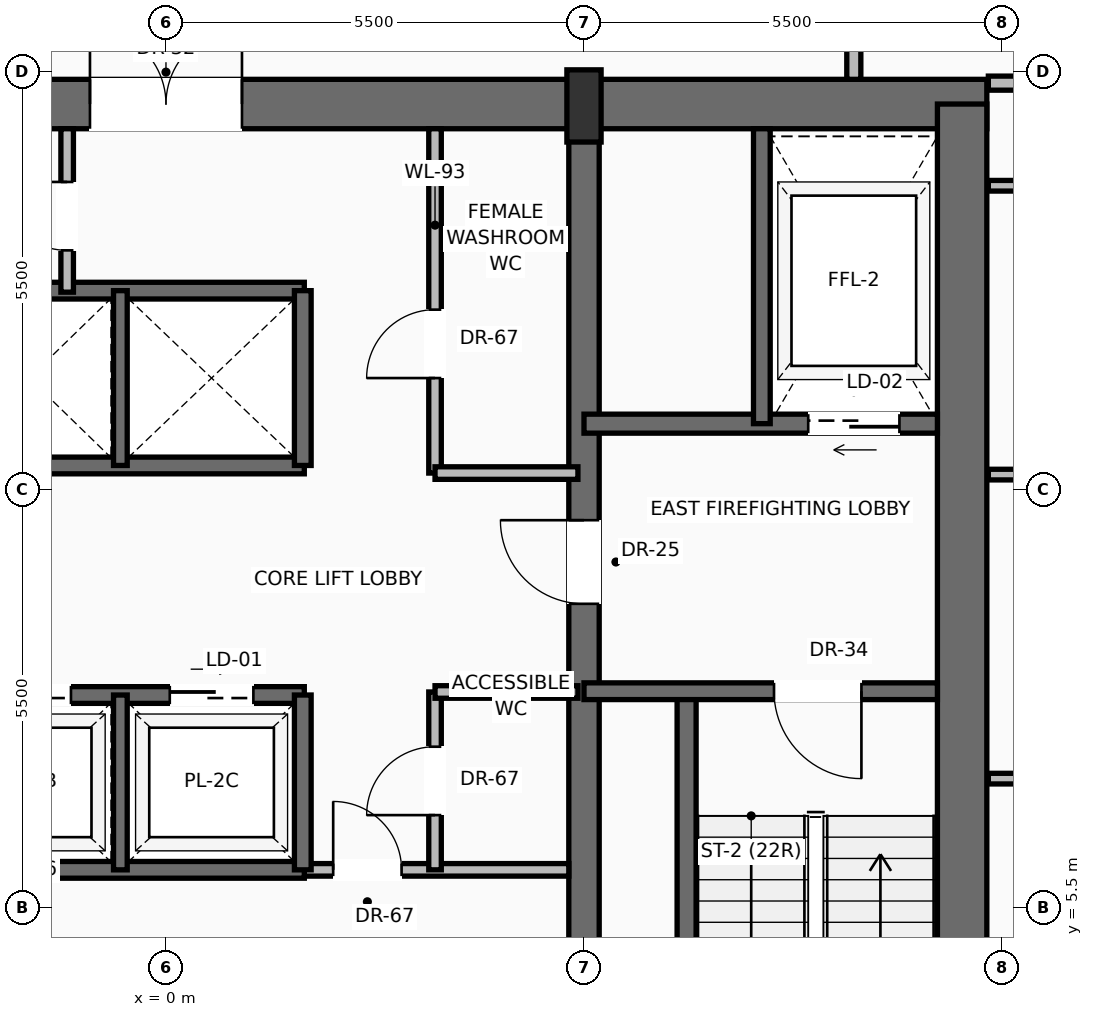
"""IFC4 building model, lengths in metres.
Left out: names, types, materials, properties, quantities, classifications, styles, units other than length and angle.
Written with IfcOpenShell. Run it as: python <this file> out.ifc"""

import sys

from ifc_helpers import new_model, si_unit, direction, frame, frame_2d, origin, origin_2d, place, context, subcontext, project, spatial, rectangle, extrude, source, transform, mapped, element, fill, save


model = new_model("IFC4")
c1 = context("Model", 3, precision=1e-05, world=origin(), true_north=direction((0.0, 1.0)))
c2 = subcontext(c1, "Body", "Model", "MODEL_VIEW")
j1 = project(units=[si_unit("LENGTHUNIT", "METRE"), si_unit("PLANEANGLEUNIT", "RADIAN")], contexts=[c1])
p1 = place(None, origin())
s1 = spatial("IfcSite", under=j1, at=p1, CompositionType="ELEMENT")
p2 = place(p1, origin())
s2 = spatial("IfcBuilding", under=s1, at=p2, CompositionType="ELEMENT")
p3 = place(p2, frame((0.0, 0.0, 204.3)))
s3 = spatial("IfcBuildingStorey", under=s2, at=p3, CompositionType="ELEMENT", Elevation=204.3)
p4 = place(p3, frame((-10.8, 16.075, 0.0), z_axis=(0.0, 0.0, 1.0), x_axis=(1.0, 0.0, 0.0)))
e1 = element("IfcWall", 1, at=p4, inside=s3, PredefinedType="SHEAR", context=c2, shape_type="SweptSolid", body=[
    extrude(rectangle(XDim=21.6, YDim=0.65, at=frame_2d((10.8, 0.0))), origin(), (0.0, 0.0, 1.0), 3.47),
])
p5 = place(p4, frame((3.37, 0.0, 0.0)))
e2 = element("IfcOpeningElement", 2, at=p5, cuts=e1, PredefinedType="OPENING", context=c2, shape_type="SweptSolid", body=[
    extrude(rectangle(XDim=1.3, YDim=2.3, at=frame_2d((0.65, 1.15))), frame((0.0, 0.335, 0.0), z_axis=(0.0, -1.0, 0.0), x_axis=(1.0, 0.0, 0.0)), (0.0, 0.0, 1.0), 0.67),
])
p6 = place(p4, frame((9.8, 0.0, 0.0)))
e3 = element("IfcOpeningElement", 3, at=p6, cuts=e1, PredefinedType="OPENING", context=c2, shape_type="SweptSolid", body=[
    extrude(rectangle(XDim=2.0, YDim=2.4, at=frame_2d((1.0, 1.2))), frame((0.0, 0.335, 0.0), z_axis=(0.0, -1.0, 0.0), x_axis=(1.0, 0.0, 0.0)), (0.0, 0.0, 1.0), 0.67),
])
p7 = place(p3, frame((10.475, 0.525, 0.0), z_axis=(0.0, 0.0, 1.0), x_axis=(0.0, 1.0, 0.0)))
e4 = element("IfcWall", 4, at=p7, inside=s3, PredefinedType="SHEAR", context=c2, shape_type="SweptSolid", body=[
    extrude(rectangle(XDim=15.55, YDim=0.65, at=frame_2d((7.775, 0.0))), origin(), (0.0, 0.0, 1.0), 3.47),
])
p8 = place(p3, frame((5.5, 0.525, 0.0), z_axis=(0.0, 0.0, 1.0), x_axis=(0.0, 1.0, 0.0)))
e5 = element("IfcWall", 5, at=p8, inside=s3, PredefinedType="SHEAR", context=c2, shape_type="SweptSolid", body=[
    extrude(rectangle(XDim=15.55, YDim=0.4, at=frame_2d((7.775, 0.0))), origin(), (0.0, 0.0, 1.0), 3.47),
])
p9 = place(p8, frame((8.975, 0.0, 0.0)))
e6 = element("IfcOpeningElement", 6, at=p9, cuts=e5, PredefinedType="OPENING", context=c2, shape_type="SweptSolid", body=[
    extrude(rectangle(XDim=1.1, YDim=2.2, at=frame_2d((0.55, 1.1))), frame((0.0, 0.21, 0.0), z_axis=(0.0, -1.0, 0.0), x_axis=(1.0, 0.0, 0.0)), (0.0, 0.0, 1.0), 0.42),
])
m1 = source(origin(), c2, "Body", "SweptSolid", [
    extrude(rectangle(XDim=0.45, YDim=0.95, at=origin_2d()), origin(), (0.0, 0.0, 1.0), 3.7),
])
p10 = place(p3, frame((5.5, 16.05, 0.0), z_axis=(0.0, 0.0, 1.0), x_axis=(1.0, 0.0, 0.0)))
e7 = element("IfcColumn", 7, at=p10, inside=s3, PredefinedType="PILASTER", context=c2, shape_type="MappedRepresentation", body=[
    mapped(m1, transform((0.0, 0.0, 0.0), scale=1.0)),
])
p11 = place(p3, frame((9.417, 32.314, 0.0), z_axis=(0.0, 0.0, 1.0), x_axis=(0.533466142651, -0.845821420067, 0.0)))
e8 = element("IfcWall", 8, at=p11, inside=s3, PredefinedType="SOLIDWALL", context=c2, shape_type="SweptSolid", body=[
    extrude(rectangle(XDim=19.147, YDim=0.28, at=frame_2d((9.574, 0.0))), origin(), (0.0, 0.0, 1.0), 3.05),
])
p12 = place(p11, frame((4.595, 0.0, 0.0)))
e9 = element("IfcOpeningElement", 9, at=p12, cuts=e8, PredefinedType="OPENING", context=c2, shape_type="SweptSolid", body=[
    extrude(rectangle(XDim=1.6, YDim=2.35, at=frame_2d((0.8, 1.175))), frame((0.0, 0.15, 0.0), z_axis=(0.0, -1.0, 0.0), x_axis=(1.0, 0.0, 0.0)), (0.0, 0.0, 1.0), 0.3),
])
p13 = place(p11, frame((13.02, 0.0, 0.9)))
e10 = element("IfcOpeningElement", 10, at=p13, cuts=e8, PredefinedType="OPENING", context=c2, shape_type="SweptSolid", body=[
    extrude(rectangle(XDim=2.0, YDim=1.85, at=frame_2d((1.0, 0.925))), frame((0.0, 0.15, 0.0), z_axis=(0.0, -1.0, 0.0), x_axis=(1.0, 0.0, 0.0)), (0.0, 0.0, 1.0), 0.3),
])
p14 = place(p3, frame((6.85, 0.85, 0.0), z_axis=(0.0, 0.0, 1.0), x_axis=(0.0, 1.0, 0.0)))
e11 = element("IfcWall", 11, at=p14, inside=s3, PredefinedType="SOLIDWALL", context=c2, shape_type="SweptSolid", body=[
    extrude(rectangle(XDim=7.5, YDim=0.25, at=frame_2d((3.75, 0.0))), origin(), (0.0, 0.0, 1.0), 3.47),
])
p15 = place(p3, frame((10.15, 8.35, 0.0), z_axis=(0.0, 0.0, 1.0), x_axis=(-1.0, 0.0, 0.0)))
e12 = element("IfcWall", 12, at=p15, inside=s3, PredefinedType="SOLIDWALL", context=c2, shape_type="SweptSolid", body=[
    extrude(rectangle(XDim=4.65, YDim=0.22, at=frame_2d((2.325, 0.0))), origin(), (0.0, 0.0, 1.0), 3.47),
])
p16 = place(p15, frame((1.0, 0.0, 0.0)))
e13 = element("IfcOpeningElement", 13, at=p16, cuts=e12, PredefinedType="OPENING", context=c2, shape_type="SweptSolid", body=[
    extrude(rectangle(XDim=1.15, YDim=2.2, at=frame_2d((0.575, 1.1))), frame((0.0, 0.12, 0.0), z_axis=(0.0, -1.0, 0.0), x_axis=(1.0, 0.0, 0.0)), (0.0, 0.0, 1.0), 0.24),
])
p17 = place(p3, frame((10.15, 11.87, 0.0), z_axis=(0.0, 0.0, 1.0), x_axis=(-1.0, 0.0, 0.0)))
e14 = element("IfcWall", 14, at=p17, inside=s3, PredefinedType="SOLIDWALL", context=c2, shape_type="SweptSolid", body=[
    extrude(rectangle(XDim=4.65, YDim=0.25, at=frame_2d((2.325, 0.0))), origin(), (0.0, 0.0, 1.0), 3.47),
])
p18 = place(p17, frame((0.5, 0.0, 0.0)))
e15 = element("IfcOpeningElement", 15, at=p18, cuts=e14, PredefinedType="OPENING", context=c2, shape_type="SweptSolid", body=[
    extrude(rectangle(XDim=1.2, YDim=2.25, at=frame_2d((0.6, 1.125))), frame((0.0, 0.135, 0.0), z_axis=(0.0, -1.0, 0.0), x_axis=(1.0, 0.0, 0.0)), (0.0, 0.0, 1.0), 0.27),
])
p19 = place(p3, frame((7.84, 11.87, 0.0), z_axis=(0.0, 0.0, 1.0), x_axis=(0.0, 1.0, 0.0)))
e16 = element("IfcWall", 16, at=p19, inside=s3, PredefinedType="SOLIDWALL", context=c2, shape_type="SweptSolid", body=[
    extrude(rectangle(XDim=3.88, YDim=0.22, at=frame_2d((1.94, 0.0))), origin(), (0.0, 0.0, 1.0), 3.47),
])
p20 = place(p3, frame((1.82, 6.0, 0.0), z_axis=(0.0, 0.0, 1.0), x_axis=(1.0, 0.0, 0.0)))
e17 = element("IfcWall", 17, at=p20, inside=s3, PredefinedType="PARTITIONING", context=c2, shape_type="SweptSolid", body=[
    extrude(rectangle(XDim=3.48, YDim=0.165, at=frame_2d((1.74, 0.0))), origin(), (0.0, 0.0, 1.0), 3.462),
])
p21 = place(p20, frame((0.38, 0.0, 0.0)))
e18 = element("IfcOpeningElement", 18, at=p21, cuts=e17, PredefinedType="OPENING", context=c2, shape_type="SweptSolid", body=[
    extrude(rectangle(XDim=0.9, YDim=2.1, at=frame_2d((0.45, 1.05))), frame((0.0, 0.093, 0.0), z_axis=(0.0, -1.0, 0.0), x_axis=(1.0, 0.0, 0.0)), (0.0, 0.0, 1.0), 0.185),
])
p22 = place(p3, frame((3.54, 6.0, 0.0), z_axis=(0.0, 0.0, 1.0), x_axis=(0.0, 1.0, 0.0)))
e19 = element("IfcWall", 19, at=p22, inside=s3, PredefinedType="PARTITIONING", context=c2, shape_type="SweptSolid", body=[
    extrude(rectangle(XDim=2.34, YDim=0.165, at=frame_2d((1.17, 0.0))), origin(), (0.0, 0.0, 1.0), 3.462),
])
p23 = place(p22, frame((0.72, 0.0, 0.0)))
e20 = element("IfcOpeningElement", 20, at=p23, cuts=e19, PredefinedType="OPENING", context=c2, shape_type="SweptSolid", body=[
    extrude(rectangle(XDim=0.9, YDim=2.1, at=frame_2d((0.45, 1.05))), frame((0.0, 0.093, 0.0), z_axis=(0.0, -1.0, 0.0), x_axis=(1.0, 0.0, 0.0)), (0.0, 0.0, 1.0), 0.185),
])
p24 = place(p3, frame((3.54, 8.34, 0.0), z_axis=(0.0, 0.0, 1.0), x_axis=(1.0, 0.0, 0.0)))
e21 = element("IfcWall", 21, at=p24, inside=s3, PredefinedType="PARTITIONING", context=c2, shape_type="SweptSolid", body=[
    extrude(rectangle(XDim=1.88, YDim=0.165, at=frame_2d((0.94, 0.0))), origin(), (0.0, 0.0, 1.0), 3.462),
])
p25 = place(p3, frame((-5.5, 6.0, 0.0), z_axis=(0.0, 0.0, 1.0), x_axis=(1.0, 0.0, 0.0)))
e22 = element("IfcWall", 22, at=p25, inside=s3, PredefinedType="SOLIDWALL", context=c2, shape_type="SweptSolid", body=[
    extrude(rectangle(XDim=7.32, YDim=0.22, at=frame_2d((3.66, 0.0))), origin(), (0.0, 0.0, 1.0), 3.47),
])
p26 = place(p3, frame((-5.5, 8.3, 0.0), z_axis=(0.0, 0.0, 1.0), x_axis=(1.0, 0.0, 0.0)))
e23 = element("IfcWall", 23, at=p26, inside=s3, PredefinedType="SOLIDWALL", context=c2, shape_type="SweptSolid", body=[
    extrude(rectangle(XDim=7.32, YDim=0.22, at=frame_2d((3.66, 0.0))), origin(), (0.0, 0.0, 1.0), 3.47),
])
p27 = place(p26, frame((0.75, 0.0, 0.0)))
e24 = element("IfcOpeningElement", 24, at=p27, cuts=e23, PredefinedType="OPENING", context=c2, shape_type="SweptSolid", body=[
    extrude(rectangle(XDim=1.1, YDim=2.2, at=frame_2d((0.55, 1.1))), frame((0.0, 0.12, 0.0), z_axis=(0.0, -1.0, 0.0), x_axis=(1.0, 0.0, 0.0)), (0.0, 0.0, 1.0), 0.24),
])
p28 = place(p26, frame((3.15, 0.0, 0.0)))
e25 = element("IfcOpeningElement", 25, at=p28, cuts=e23, PredefinedType="OPENING", context=c2, shape_type="SweptSolid", body=[
    extrude(rectangle(XDim=1.1, YDim=2.2, at=frame_2d((0.55, 1.1))), frame((0.0, 0.12, 0.0), z_axis=(0.0, -1.0, 0.0), x_axis=(1.0, 0.0, 0.0)), (0.0, 0.0, 1.0), 0.24),
])
p29 = place(p26, frame((5.55, 0.0, 0.0)))
e26 = element("IfcOpeningElement", 26, at=p29, cuts=e23, PredefinedType="OPENING", context=c2, shape_type="SweptSolid", body=[
    extrude(rectangle(XDim=1.1, YDim=2.2, at=frame_2d((0.55, 1.1))), frame((0.0, 0.12, 0.0), z_axis=(0.0, -1.0, 0.0), x_axis=(1.0, 0.0, 0.0)), (0.0, 0.0, 1.0), 0.24),
])
p30 = place(p3, frame((1.8, 6.0, 0.0), z_axis=(0.0, 0.0, 1.0), x_axis=(0.0, 1.0, 0.0)))
e27 = element("IfcWall", 27, at=p30, inside=s3, PredefinedType="SOLIDWALL", context=c2, shape_type="SweptSolid", body=[
    extrude(rectangle(XDim=2.3, YDim=0.22, at=frame_2d((1.15, 0.0))), origin(), (0.0, 0.0, 1.0), 3.47),
])
p31 = place(p3, frame((-0.6, 6.0, 0.0), z_axis=(0.0, 0.0, 1.0), x_axis=(0.0, 1.0, 0.0)))
e28 = element("IfcWall", 28, at=p31, inside=s3, PredefinedType="SOLIDWALL", context=c2, shape_type="SweptSolid", body=[
    extrude(rectangle(XDim=2.3, YDim=0.18, at=frame_2d((1.15, 0.0))), origin(), (0.0, 0.0, 1.0), 3.47),
])
for number, where, z_axis, x_axis in (
    (29, (-5.5, 11.32, 0.0), (0.0, 0.0, 1.0), (1.0, 0.0, 0.0)),
    (30, (-5.5, 13.62, 0.0), (0.0, 0.0, 1.0), (1.0, 0.0, 0.0)),
):
    element("IfcWall", number, at=place(p3, frame(where, z_axis=z_axis, x_axis=x_axis)), inside=s3, PredefinedType="SOLIDWALL", context=c2, shape_type="SweptSolid", body=[
        extrude(rectangle(XDim=7.32, YDim=0.22, at=frame_2d((3.66, 0.0))), origin(), (0.0, 0.0, 1.0), 3.47),
    ])
p32 = place(p3, frame((1.8, 11.32, 0.0), z_axis=(0.0, 0.0, 1.0), x_axis=(0.0, 1.0, 0.0)))
e31 = element("IfcWall", 31, at=p32, inside=s3, PredefinedType="SOLIDWALL", context=c2, shape_type="SweptSolid", body=[
    extrude(rectangle(XDim=2.3, YDim=0.22, at=frame_2d((1.15, 0.0))), origin(), (0.0, 0.0, 1.0), 3.47),
])
p33 = place(p3, frame((-0.6, 11.32, 0.0), z_axis=(0.0, 0.0, 1.0), x_axis=(0.0, 1.0, 0.0)))
e32 = element("IfcWall", 32, at=p33, inside=s3, PredefinedType="SOLIDWALL", context=c2, shape_type="SweptSolid", body=[
    extrude(rectangle(XDim=2.3, YDim=0.18, at=frame_2d((1.15, 0.0))), origin(), (0.0, 0.0, 1.0), 3.47),
])
p34 = place(p3, frame((-1.3, 13.6, 0.0), z_axis=(0.0, 0.0, 1.0), x_axis=(0.0, 1.0, 0.0)))
e33 = element("IfcWall", 33, at=p34, inside=s3, PredefinedType="PARTITIONING", context=c2, shape_type="SweptSolid", body=[
    extrude(rectangle(XDim=2.15, YDim=0.165, at=frame_2d((1.075, 0.0))), origin(), (0.0, 0.0, 1.0), 3.462),
])
p35 = place(p34, frame((0.55, 0.0, 0.0)))
e34 = element("IfcOpeningElement", 34, at=p35, cuts=e33, PredefinedType="OPENING", context=c2, shape_type="SweptSolid", body=[
    extrude(rectangle(XDim=0.9, YDim=2.1, at=frame_2d((0.45, 1.05))), frame((0.0, 0.093, 0.0), z_axis=(0.0, -1.0, 0.0), x_axis=(1.0, 0.0, 0.0)), (0.0, 0.0, 1.0), 0.185),
])
p36 = place(p3, frame((3.54, 11.22, 0.0), z_axis=(0.0, 0.0, 1.0), x_axis=(0.0, 1.0, 0.0)))
e35 = element("IfcWall", 35, at=p36, inside=s3, PredefinedType="PARTITIONING", context=c2, shape_type="SweptSolid", body=[
    extrude(rectangle(XDim=4.53, YDim=0.165, at=frame_2d((2.265, 0.0))), origin(), (0.0, 0.0, 1.0), 3.462),
])
p37 = place(p36, frame((1.25, 0.0, 0.0)))
e36 = element("IfcOpeningElement", 36, at=p37, cuts=e35, PredefinedType="OPENING", context=c2, shape_type="SweptSolid", body=[
    extrude(rectangle(XDim=0.9, YDim=2.1, at=frame_2d((0.45, 1.05))), frame((0.0, 0.093, 0.0), z_axis=(0.0, -1.0, 0.0), x_axis=(1.0, 0.0, 0.0)), (0.0, 0.0, 1.0), 0.185),
])
p38 = place(p3, frame((3.54, 11.22, 0.0), z_axis=(0.0, 0.0, 1.0), x_axis=(1.0, 0.0, 0.0)))
e37 = element("IfcWall", 37, at=p38, inside=s3, PredefinedType="PARTITIONING", context=c2, shape_type="SweptSolid", body=[
    extrude(rectangle(XDim=1.88, YDim=0.165, at=frame_2d((0.94, 0.0))), origin(), (0.0, 0.0, 1.0), 3.462),
])
p39 = place(p3, frame((9.05, 16.4, 0.0), z_axis=(0.0, 0.0, 1.0), x_axis=(0.0, 1.0, 0.0)))
e38 = element("IfcWall", 38, at=p39, inside=s3, PredefinedType="PARTITIONING", context=c2, shape_type="SweptSolid", body=[
    extrude(rectangle(XDim=5.8, YDim=0.185, at=frame_2d((2.9, 0.0))), origin(), (0.0, 0.0, 1.0), 3.462),
])
p40 = place(p39, frame((1.942, 0.0, 0.0)))
e39 = element("IfcOpeningElement", 39, at=p40, cuts=e38, PredefinedType="OPENING", context=c2, shape_type="SweptSolid", body=[
    extrude(rectangle(XDim=0.95, YDim=2.2, at=frame_2d((0.475, 1.1))), frame((0.0, 0.103, 0.0), z_axis=(0.0, -1.0, 0.0), x_axis=(1.0, 0.0, 0.0)), (0.0, 0.0, 1.0), 0.205),
])
p41 = place(p3, frame((10.82, 16.35, 0.0), z_axis=(0.0, 0.0, 1.0), x_axis=(1.0, 0.0, 0.0)))
e40 = element("IfcWall", 40, at=p41, inside=s3, PredefinedType="PARTITIONING", context=c2, shape_type="SweptSolid", body=[
    extrude(rectangle(XDim=8.819, YDim=0.185, at=frame_2d((4.409, 0.0))), origin(), (0.0, 0.0, 1.0), 3.462),
])
p42 = place(p41, frame((2.714, 0.0, 0.0)))
e41 = element("IfcOpeningElement", 41, at=p42, cuts=e40, PredefinedType="OPENING", context=c2, shape_type="SweptSolid", body=[
    extrude(rectangle(XDim=0.95, YDim=2.2, at=frame_2d((0.475, 1.1))), frame((0.0, 0.103, 0.0), z_axis=(0.0, -1.0, 0.0), x_axis=(1.0, 0.0, 0.0)), (0.0, 0.0, 1.0), 0.205),
])
p43 = place(p3, frame((10.82, 7.2, 0.0), z_axis=(0.0, 0.0, 1.0), x_axis=(1.0, 0.0, 0.0)))
e42 = element("IfcWall", 42, at=p43, inside=s3, PredefinedType="PARTITIONING", context=c2, shape_type="SweptSolid", body=[
    extrude(rectangle(XDim=14.59, YDim=0.14, at=frame_2d((7.295, 0.0))), origin(), (0.0, 0.0, 1.0), 3.049),
])
p44 = place(p43, frame((6.812, 0.0, 0.0)))
e43 = element("IfcOpeningElement", 43, at=p44, cuts=e42, PredefinedType="OPENING", context=c2, shape_type="SweptSolid", body=[
    extrude(rectangle(XDim=0.95, YDim=2.2, at=frame_2d((0.475, 1.1))), frame((0.0, 0.08, 0.0), z_axis=(0.0, -1.0, 0.0), x_axis=(1.0, 0.0, 0.0)), (0.0, 0.0, 1.0), 0.16),
])
p45 = place(p3, frame((10.82, 11.2, 0.0), z_axis=(0.0, 0.0, 1.0), x_axis=(1.0, 0.0, 0.0)))
e44 = element("IfcWall", 44, at=p45, inside=s3, PredefinedType="PARTITIONING", context=c2, shape_type="SweptSolid", body=[
    extrude(rectangle(XDim=12.067, YDim=0.14, at=frame_2d((6.033, 0.0))), origin(), (0.0, 0.0, 1.0), 3.462),
])
p46 = place(p45, frame((5.551, 0.0, 0.0)))
e45 = element("IfcOpeningElement", 45, at=p46, cuts=e44, PredefinedType="OPENING", context=c2, shape_type="SweptSolid", body=[
    extrude(rectangle(XDim=0.95, YDim=2.2, at=frame_2d((0.475, 1.1))), frame((0.0, 0.08, 0.0), z_axis=(0.0, -1.0, 0.0), x_axis=(1.0, 0.0, 0.0)), (0.0, 0.0, 1.0), 0.16),
])
p47 = place(p3, frame((10.82, 15.0, 0.0), z_axis=(0.0, 0.0, 1.0), x_axis=(1.0, 0.0, 0.0)))
e46 = element("IfcWall", 46, at=p47, inside=s3, PredefinedType="PARTITIONING", context=c2, shape_type="SweptSolid", body=[
    extrude(rectangle(XDim=9.67, YDim=0.14, at=frame_2d((4.835, 0.0))), origin(), (0.0, 0.0, 1.0), 3.462),
])
p48 = place(p47, frame((4.353, 0.0, 0.0)))
e47 = element("IfcOpeningElement", 47, at=p48, cuts=e46, PredefinedType="OPENING", context=c2, shape_type="SweptSolid", body=[
    extrude(rectangle(XDim=0.95, YDim=2.2, at=frame_2d((0.475, 1.1))), frame((0.0, 0.08, 0.0), z_axis=(0.0, -1.0, 0.0), x_axis=(1.0, 0.0, 0.0)), (0.0, 0.0, 1.0), 0.16),
])
m2 = source(origin(), c2, "Body", "SweptSolid", [
    extrude(rectangle(XDim=1.15, YDim=2.2, at=frame_2d((0.575, 1.1))), frame((0.0, 0.025, 0.0), z_axis=(0.0, -1.0, 0.0), x_axis=(1.0, 0.0, 0.0)), (0.0, 0.0, 1.0), 0.05),
])
p49 = place(p16, origin())
e48 = element("IfcDoor", 48, at=p49, inside=s3, OperationType="SINGLE_SWING_LEFT", PredefinedType="DOOR", context=c2, shape_type="MappedRepresentation", body=[
    mapped(m2, transform((0.0, 0.0, 0.0), scale=1.0)),
])
fill(e13, e48)
m3 = source(origin(), c2, "Body", "SweptSolid", [
    extrude(rectangle(XDim=1.1, YDim=2.2, at=frame_2d((0.55, 1.1))), frame((0.0, 0.025, 0.0), z_axis=(0.0, -1.0, 0.0), x_axis=(1.0, 0.0, 0.0)), (0.0, 0.0, 1.0), 0.05),
])
p50 = place(p9, origin())
e49 = element("IfcDoor", 49, at=p50, inside=s3, OperationType="SINGLE_SWING_RIGHT", PredefinedType="DOOR", context=c2, shape_type="MappedRepresentation", body=[
    mapped(m3, transform((0.0, 0.0, 0.0), scale=1.0)),
])
fill(e6, e49)
m4 = source(origin(), c2, "Body", "SweptSolid", [
    extrude(rectangle(XDim=1.2, YDim=2.25, at=frame_2d((0.6, 1.125))), frame((0.0, 0.025, 0.0), z_axis=(0.0, -1.0, 0.0), x_axis=(1.0, 0.0, 0.0)), (0.0, 0.0, 1.0), 0.05),
])
p51 = place(p18, origin())
e50 = element("IfcDoor", 50, at=p51, inside=s3, OperationType="SLIDING_TO_RIGHT", PredefinedType="DOOR", context=c2, shape_type="MappedRepresentation", body=[
    mapped(m4, transform((0.0, 0.0, 0.0), scale=1.0)),
])
fill(e15, e50)
m5 = source(origin(), c2, "Body", "SweptSolid", [
    extrude(rectangle(XDim=2.0, YDim=2.4, at=frame_2d((1.0, 1.2))), frame((0.0, 0.025, 0.0), z_axis=(0.0, -1.0, 0.0), x_axis=(1.0, 0.0, 0.0)), (0.0, 0.0, 1.0), 0.05),
])
p52 = place(p6, origin())
e51 = element("IfcDoor", 51, at=p52, inside=s3, OperationType="DOUBLE_DOOR_SINGLE_SWING", PredefinedType="DOOR", context=c2, shape_type="MappedRepresentation", body=[
    mapped(m5, transform((0.0, 0.0, 0.0), scale=1.0)),
])
fill(e3, e51)
m6 = source(origin(), c2, "Body", "SweptSolid", [
    extrude(rectangle(XDim=0.9, YDim=2.1, at=frame_2d((0.45, 1.05))), frame((0.0, 0.025, 0.0), z_axis=(0.0, -1.0, 0.0), x_axis=(1.0, 0.0, 0.0)), (0.0, 0.0, 1.0), 0.05),
])
p53 = place(p21, origin())
e52 = element("IfcDoor", 52, at=p53, inside=s3, OperationType="SINGLE_SWING_LEFT", PredefinedType="DOOR", context=c2, shape_type="MappedRepresentation", body=[
    mapped(m6, transform((0.0, 0.0, 0.0), scale=1.0)),
])
fill(e18, e52)
p54 = place(p23, origin())
e53 = element("IfcDoor", 53, at=p54, inside=s3, OperationType="SINGLE_SWING_LEFT", PredefinedType="DOOR", context=c2, shape_type="MappedRepresentation", body=[
    mapped(m6, transform((0.0, 0.0, 0.0), scale=1.0)),
])
fill(e20, e53)
m7 = source(origin(), c2, "Body", "SweptSolid", [
    extrude(rectangle(XDim=1.1, YDim=2.2, at=frame_2d((0.55, 1.1))), frame((0.0, 0.025, 0.0), z_axis=(0.0, -1.0, 0.0), x_axis=(1.0, 0.0, 0.0)), (0.0, 0.0, 1.0), 0.05),
])
p55 = place(p28, origin())
e54 = element("IfcDoor", 54, at=p55, inside=s3, OperationType="SLIDING_TO_LEFT", PredefinedType="DOOR", context=c2, shape_type="MappedRepresentation", body=[
    mapped(m7, transform((0.0, 0.0, 0.0), scale=1.0)),
])
fill(e25, e54)
p56 = place(p29, origin())
e55 = element("IfcDoor", 55, at=p56, inside=s3, OperationType="SLIDING_TO_LEFT", PredefinedType="DOOR", context=c2, shape_type="MappedRepresentation", body=[
    mapped(m7, transform((0.0, 0.0, 0.0), scale=1.0)),
])
fill(e26, e55)
p57 = place(p35, origin())
e56 = element("IfcDoor", 56, at=p57, inside=s3, OperationType="SINGLE_SWING_RIGHT", PredefinedType="DOOR", context=c2, shape_type="MappedRepresentation", body=[
    mapped(m6, transform((0.0, 0.0, 0.0), scale=1.0)),
])
fill(e34, e56)
p58 = place(p37, origin())
e57 = element("IfcDoor", 57, at=p58, inside=s3, OperationType="SINGLE_SWING_LEFT", PredefinedType="DOOR", context=c2, shape_type="MappedRepresentation", body=[
    mapped(m6, transform((0.0, 0.0, 0.0), scale=1.0)),
])
fill(e36, e57)
save(model, sys.argv[1])
